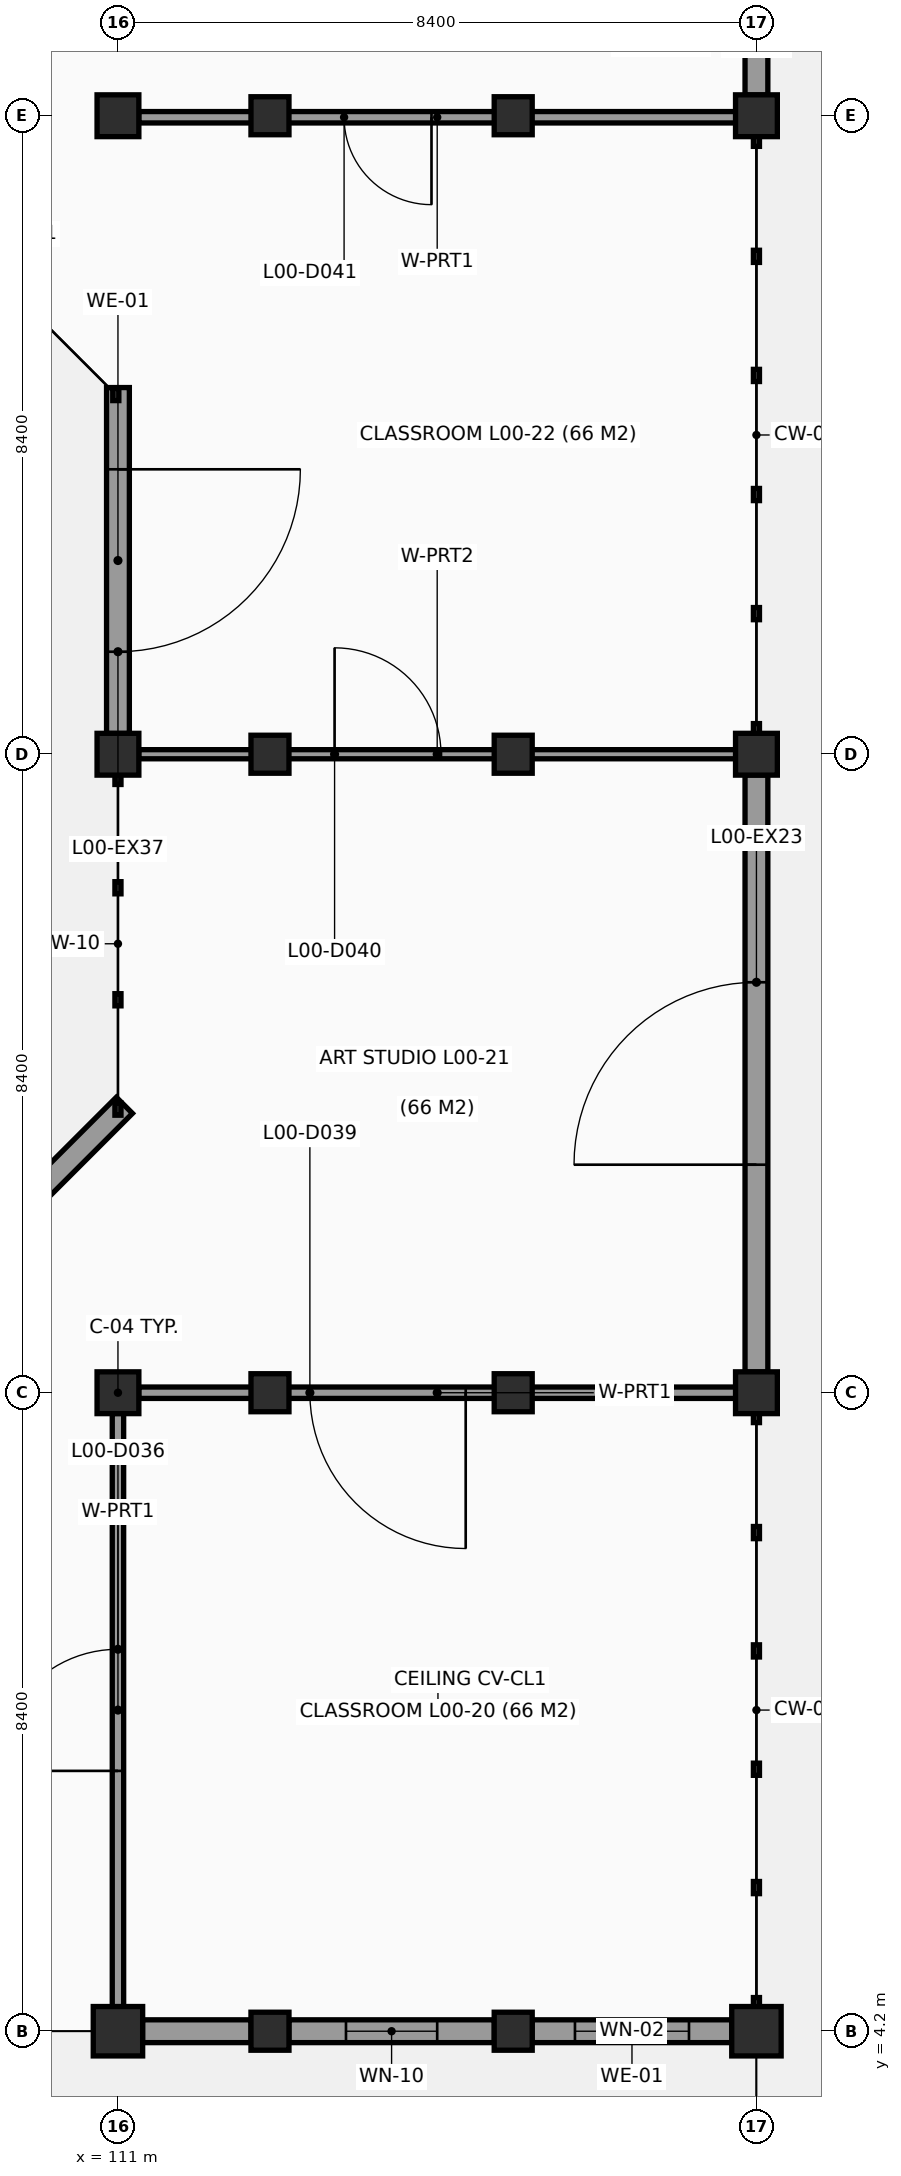
"""IFC4 building model, lengths in metres.
Left out: names, types, materials, properties, quantities, classifications, styles, units other than length and angle.
Written with IfcOpenShell. Run it as: python <this file> out.ifc"""

import sys

from ifc_helpers import new_model, si_unit, direction, frame, frame_2d, origin, origin_2d, place, context, subcontext, project, spatial, rectangle, extrude, element, fill, save


model = new_model("IFC4")
c1 = context("Model", 3, precision=1e-05, world=origin(), true_north=direction((0.0, 1.0)))
c2 = subcontext(c1, "Body", "Model", "MODEL_VIEW")
j1 = project(units=[si_unit("LENGTHUNIT", "METRE"), si_unit("PLANEANGLEUNIT", "RADIAN")], contexts=[c1])
p1 = place(None, origin())
s1 = spatial("IfcSite", under=j1, at=p1, CompositionType="ELEMENT")
p2 = place(p1, origin())
s2 = spatial("IfcBuilding", under=s1, at=p2, CompositionType="ELEMENT")
p3 = place(p2, origin())
s3 = spatial("IfcBuildingStorey", under=s2, at=p3, CompositionType="ELEMENT", Elevation=0.0)
p4 = place(p3, frame((111.0, 4.2, -0.4), z_axis=(0.0, 0.0, 1.0), x_axis=(1.0, 0.0, 0.0)))
e1 = element("IfcColumn", 1, at=p4, inside=s3, PredefinedType="COLUMN", context=c2, shape_type="SweptSolid", body=[
    extrude(rectangle(XDim=0.65, YDim=0.65, at=origin_2d()), origin(), (0.0, 0.0, 1.0), 4.6),
])
for number, where, z_axis, x_axis in (
    (2, (111.0, 12.6, -0.4), (0.0, 0.0, 1.0), (1.0, 0.0, 0.0)),
    (3, (111.0, 21.0, -0.4), (0.0, 0.0, 1.0), (1.0, 0.0, 0.0)),
    (4, (111.0, 29.4, -0.4), (0.0, 0.0, 1.0), (1.0, 0.0, 0.0)),
):
    element("IfcColumn", number, at=place(p3, frame(where, z_axis=z_axis, x_axis=x_axis)), inside=s3, PredefinedType="COLUMN", context=c2, shape_type="SweptSolid", body=[
        extrude(rectangle(XDim=0.55, YDim=0.55, at=origin_2d()), origin(), (0.0, 0.0, 1.0), 4.6),
    ])
p5 = place(p3, frame((119.4, 4.2, -0.4), z_axis=(0.0, 0.0, 1.0), x_axis=(1.0, 0.0, 0.0)))
e5 = element("IfcColumn", 5, at=p5, inside=s3, PredefinedType="COLUMN", context=c2, shape_type="SweptSolid", body=[
    extrude(rectangle(XDim=0.65, YDim=0.65, at=origin_2d()), origin(), (0.0, 0.0, 1.0), 4.6),
])
for number, where, z_axis, x_axis in (
    (6, (119.4, 12.6, -0.4), (0.0, 0.0, 1.0), (1.0, 0.0, 0.0)),
    (7, (119.4, 21.0, -0.4), (0.0, 0.0, 1.0), (1.0, 0.0, 0.0)),
    (8, (119.4, 29.4, -0.4), (0.0, 0.0, 1.0), (1.0, 0.0, 0.0)),
):
    element("IfcColumn", number, at=place(p3, frame(where, z_axis=z_axis, x_axis=x_axis)), inside=s3, PredefinedType="COLUMN", context=c2, shape_type="SweptSolid", body=[
        extrude(rectangle(XDim=0.55, YDim=0.55, at=origin_2d()), origin(), (0.0, 0.0, 1.0), 4.6),
    ])
for number, where, z_axis, x_axis in (
    (9, (116.2, 4.2, -0.4), (0.0, 0.0, 1.0), (1.0, 0.0, 0.0)),
    (10, (116.2, 12.6, -0.4), (0.0, 0.0, 1.0), (1.0, 0.0, 0.0)),
    (11, (116.2, 21.0, -0.4), (0.0, 0.0, 1.0), (1.0, 0.0, 0.0)),
    (12, (116.2, 29.4, -0.4), (0.0, 0.0, 1.0), (1.0, 0.0, 0.0)),
    (13, (113.0, 4.2, -0.4), (0.0, 0.0, 1.0), (1.0, 0.0, 0.0)),
    (14, (113.0, 12.6, -0.4), (0.0, 0.0, 1.0), (1.0, 0.0, 0.0)),
    (15, (113.0, 21.0, -0.4), (0.0, 0.0, 1.0), (1.0, 0.0, 0.0)),
    (16, (113.0, 29.4, -0.4), (0.0, 0.0, 1.0), (1.0, 0.0, 0.0)),
):
    element("IfcColumn", number, at=place(p3, frame(where, z_axis=z_axis, x_axis=x_axis)), inside=s3, PredefinedType="COLUMN", context=c2, shape_type="SweptSolid", body=[
        extrude(rectangle(XDim=0.5, YDim=0.5, at=origin_2d()), origin(), (0.0, 0.0, 1.0), 4.6),
    ])
p6 = place(p3, frame((119.4, 32.077, 0.0), z_axis=(0.0, 0.0, 1.0), x_axis=(0.0, -1.0, 0.0)))
e17 = element("IfcWall", 17, at=p6, inside=s3, PredefinedType="SOLIDWALL", context=c2, shape_type="SweptSolid", body=[
    extrude(rectangle(XDim=2.404, YDim=0.3, at=frame_2d((1.202, 0.0))), origin(), (0.0, 0.0, 1.0), 3.33),
])
p7 = place(p6, frame((0.602, 0.0, 0.95)))
e18 = element("IfcOpeningElement", 18, at=p7, cuts=e17, PredefinedType="OPENING", context=c2, shape_type="SweptSolid", body=[
    extrude(rectangle(XDim=1.2, YDim=1.2, at=frame_2d((0.6, 0.6))), frame((0.0, 0.16, 0.0), z_axis=(0.0, -1.0, 0.0), x_axis=(1.0, 0.0, 0.0)), (0.0, 0.0, 1.0), 0.32),
])
p8 = place(p3, frame((119.4, 20.727, 0.0), z_axis=(0.0, 0.0, 1.0), x_axis=(0.0, -1.0, 0.0)))
e19 = element("IfcWall", 19, at=p8, inside=s3, PredefinedType="SOLIDWALL", context=c2, shape_type="SweptSolid", body=[
    extrude(rectangle(XDim=7.854, YDim=0.3, at=frame_2d((3.927, 0.0))), origin(), (0.0, 0.0, 1.0), 3.28),
])
p9 = place(p8, frame((2.727, 0.0, 0.0)))
e20 = element("IfcOpeningElement", 20, at=p9, cuts=e19, PredefinedType="OPENING", context=c2, shape_type="SweptSolid", body=[
    extrude(rectangle(XDim=2.4, YDim=2.45, at=frame_2d((1.2, 1.225))), frame((0.0, 0.16, 0.0), z_axis=(0.0, -1.0, 0.0), x_axis=(1.0, 0.0, 0.0)), (0.0, 0.0, 1.0), 0.32),
])
p10 = place(p3, frame((119.077, 4.2, 0.0), z_axis=(0.0, 0.0, 1.0), x_axis=(-1.0, 0.0, 0.0)))
e21 = element("IfcWall", 21, at=p10, inside=s3, PredefinedType="SOLIDWALL", context=c2, shape_type="SweptSolid", body=[
    extrude(rectangle(XDim=2.629, YDim=0.3, at=frame_2d((1.314, 0.0))), origin(), (0.0, 0.0, 1.0), 3.18),
])
p11 = place(p10, frame((0.564, 0.0, 0.95)))
e22 = element("IfcOpeningElement", 22, at=p11, cuts=e21, PredefinedType="OPENING", context=c2, shape_type="SweptSolid", body=[
    extrude(rectangle(XDim=1.5, YDim=1.2, at=frame_2d((0.75, 0.6))), frame((0.0, 0.16, 0.0), z_axis=(0.0, -1.0, 0.0), x_axis=(1.0, 0.0, 0.0)), (0.0, 0.0, 1.0), 0.32),
])
p12 = place(p3, frame((115.952, 4.2, 0.0), z_axis=(0.0, 0.0, 1.0), x_axis=(-1.0, 0.0, 0.0)))
e23 = element("IfcWall", 23, at=p12, inside=s3, PredefinedType="SOLIDWALL", context=c2, shape_type="SweptSolid", body=[
    extrude(rectangle(XDim=2.704, YDim=0.3, at=frame_2d((1.352, 0.0))), origin(), (0.0, 0.0, 1.0), 3.18),
])
p13 = place(p12, frame((0.752, 0.0, 0.95)))
e24 = element("IfcOpeningElement", 24, at=p13, cuts=e23, PredefinedType="OPENING", context=c2, shape_type="SweptSolid", body=[
    extrude(rectangle(XDim=1.2, YDim=1.5, at=frame_2d((0.6, 0.75))), frame((0.0, 0.16, 0.0), z_axis=(0.0, -1.0, 0.0), x_axis=(1.0, 0.0, 0.0)), (0.0, 0.0, 1.0), 0.32),
])
p14 = place(p3, frame((112.752, 4.2, 0.0), z_axis=(0.0, 0.0, 1.0), x_axis=(-1.0, 0.0, 0.0)))
e25 = element("IfcWall", 25, at=p14, inside=s3, PredefinedType="SOLIDWALL", context=c2, shape_type="SweptSolid", body=[
    extrude(rectangle(XDim=1.429, YDim=0.3, at=frame_2d((0.714, 0.0))), origin(), (0.0, 0.0, 1.0), 3.18),
])
p15 = place(p3, frame((107.219, 12.515, 0.0), z_axis=(0.0, 0.0, 1.0), x_axis=(0.707129108877, 0.707084452791, 0.0)))
e26 = element("IfcWall", 26, at=p15, inside=s3, PredefinedType="SOLIDWALL", context=c2, shape_type="SweptSolid", body=[
    extrude(rectangle(XDim=5.467, YDim=0.3, at=frame_2d((2.733, 0.0))), origin(), (0.0, 0.0, 1.0), 3.22),
])
p16 = place(p3, frame((111.0, 21.273, 0.0), z_axis=(0.0, 0.0, 1.0), x_axis=(0.0, 1.0, 0.0)))
e27 = element("IfcWall", 27, at=p16, inside=s3, PredefinedType="SOLIDWALL", context=c2, shape_type="SweptSolid", body=[
    extrude(rectangle(XDim=4.551, YDim=0.3, at=frame_2d((2.275, 0.0))), origin(), (0.0, 0.0, 1.0), 3.22),
])
p17 = place(p16, frame((1.075, 0.0, 0.0)))
e28 = element("IfcOpeningElement", 28, at=p17, cuts=e27, PredefinedType="OPENING", context=c2, shape_type="SweptSolid", body=[
    extrude(rectangle(XDim=2.4, YDim=2.45, at=frame_2d((1.2, 1.225))), frame((0.0, 0.16, 0.0), z_axis=(0.0, -1.0, 0.0), x_axis=(1.0, 0.0, 0.0)), (0.0, 0.0, 1.0), 0.32),
])
p18 = place(p3, frame((111.0, 12.327, 0.0), z_axis=(0.0, 0.0, 1.0), x_axis=(0.0, -1.0, 0.0)))
e29 = element("IfcWall", 29, at=p18, inside=s3, PredefinedType="PARTITIONING", context=c2, shape_type="SweptSolid", body=[
    extrude(rectangle(XDim=7.804, YDim=0.15, at=frame_2d((3.902, 0.0))), origin(), (0.0, 0.0, 1.0), 3.27),
])
p19 = place(p18, frame((3.102, 0.0, 0.0)))
e30 = element("IfcOpeningElement", 30, at=p19, cuts=e29, PredefinedType="OPENING", context=c2, shape_type="SweptSolid", body=[
    extrude(rectangle(XDim=1.6, YDim=2.2, at=frame_2d((0.8, 1.1))), frame((0.0, 0.085, 0.0), z_axis=(0.0, -1.0, 0.0), x_axis=(1.0, 0.0, 0.0)), (0.0, 0.0, 1.0), 0.17),
])
p20 = place(p3, frame((111.273, 12.6, 0.0), z_axis=(0.0, 0.0, 1.0), x_axis=(1.0, 0.0, 0.0)))
e31 = element("IfcWall", 31, at=p20, inside=s3, PredefinedType="PARTITIONING", context=c2, shape_type="SweptSolid", body=[
    extrude(rectangle(XDim=7.854, YDim=0.15, at=frame_2d((3.927, 0.0))), origin(), (0.0, 0.0, 1.0), 3.43),
])
p21 = place(p20, frame((2.252, 0.0, 0.0)))
e32 = element("IfcOpeningElement", 32, at=p21, cuts=e31, PredefinedType="OPENING", context=c2, shape_type="SweptSolid", body=[
    extrude(rectangle(XDim=2.05, YDim=2.35, at=frame_2d((1.025, 1.175))), frame((0.0, 0.085, 0.0), z_axis=(0.0, -1.0, 0.0), x_axis=(1.0, 0.0, 0.0)), (0.0, 0.0, 1.0), 0.17),
])
p22 = place(p3, frame((111.273, 21.0, 0.0), z_axis=(0.0, 0.0, 1.0), x_axis=(1.0, 0.0, 0.0)))
e33 = element("IfcWall", 33, at=p22, inside=s3, PredefinedType="PARTITIONING", context=c2, shape_type="SweptSolid", body=[
    extrude(rectangle(XDim=7.854, YDim=0.12, at=frame_2d((3.927, 0.0))), origin(), (0.0, 0.0, 1.0), 3.49),
])
p23 = place(p22, frame((2.577, 0.0, 0.0)))
e34 = element("IfcOpeningElement", 34, at=p23, cuts=e33, PredefinedType="OPENING", context=c2, shape_type="SweptSolid", body=[
    extrude(rectangle(XDim=1.4, YDim=2.2, at=frame_2d((0.7, 1.1))), frame((0.0, 0.07, 0.0), z_axis=(0.0, -1.0, 0.0), x_axis=(1.0, 0.0, 0.0)), (0.0, 0.0, 1.0), 0.14),
])
p24 = place(p3, frame((111.273, 29.38, 0.0), z_axis=(0.0, 0.0, 1.0), x_axis=(1.0, 0.0, 0.0)))
e35 = element("IfcWall", 35, at=p24, inside=s3, PredefinedType="PARTITIONING", context=c2, shape_type="SweptSolid", body=[
    extrude(rectangle(XDim=7.854, YDim=0.15, at=frame_2d((3.927, 0.0))), origin(), (0.0, 0.0, 1.0), 3.13),
])
p25 = place(p24, frame((2.702, 0.0, 0.0)))
e36 = element("IfcOpeningElement", 36, at=p25, cuts=e35, PredefinedType="OPENING", context=c2, shape_type="SweptSolid", body=[
    extrude(rectangle(XDim=1.15, YDim=2.15, at=frame_2d((0.575, 1.075))), frame((0.0, 0.085, 0.0), z_axis=(0.0, -1.0, 0.0), x_axis=(1.0, 0.0, 0.0)), (0.0, 0.0, 1.0), 0.17),
])
p26 = place(p9, origin())
e37 = element("IfcDoor", 37, at=p26, inside=s3, OperationType="DOUBLE_DOOR_SINGLE_SWING", PredefinedType="DOOR", context=c2, shape_type="SweptSolid", body=[
    extrude(rectangle(XDim=2.4, YDim=2.45, at=frame_2d((1.2, 1.225))), frame((0.0, 0.025, 0.0), z_axis=(0.0, -1.0, 0.0), x_axis=(1.0, 0.0, 0.0)), (0.0, 0.0, 1.0), 0.05),
])
fill(e20, e37)
p27 = place(p11, origin())
e38 = element("IfcWindow", 38, at=p27, inside=s3, PartitioningType="SINGLE_PANEL", PredefinedType="WINDOW", context=c2, shape_type="SweptSolid", body=[
    extrude(rectangle(XDim=1.5, YDim=1.2, at=frame_2d((0.75, 0.6))), frame((0.0, 0.03, 0.0), z_axis=(0.0, -1.0, 0.0), x_axis=(1.0, 0.0, 0.0)), (0.0, 0.0, 1.0), 0.06),
])
fill(e22, e38)
p28 = place(p13, origin())
e39 = element("IfcWindow", 39, at=p28, inside=s3, PartitioningType="SINGLE_PANEL", PredefinedType="WINDOW", context=c2, shape_type="SweptSolid", body=[
    extrude(rectangle(XDim=1.2, YDim=1.5, at=frame_2d((0.6, 0.75))), frame((0.0, 0.03, 0.0), z_axis=(0.0, -1.0, 0.0), x_axis=(1.0, 0.0, 0.0)), (0.0, 0.0, 1.0), 0.06),
])
fill(e24, e39)
p29 = place(p17, origin())
e40 = element("IfcDoor", 40, at=p29, inside=s3, OperationType="DOUBLE_DOOR_SINGLE_SWING", PredefinedType="DOOR", context=c2, shape_type="SweptSolid", body=[
    extrude(rectangle(XDim=2.4, YDim=2.45, at=frame_2d((1.2, 1.225))), frame((0.0, 0.025, 0.0), z_axis=(0.0, -1.0, 0.0), x_axis=(1.0, 0.0, 0.0)), (0.0, 0.0, 1.0), 0.05),
])
fill(e28, e40)
p30 = place(p19, origin())
e41 = element("IfcDoor", 41, at=p30, inside=s3, OperationType="DOUBLE_DOOR_SINGLE_SWING", PredefinedType="DOOR", context=c2, shape_type="SweptSolid", body=[
    extrude(rectangle(XDim=1.6, YDim=2.2, at=frame_2d((0.8, 1.1))), frame((0.0, 0.025, 0.0), z_axis=(0.0, -1.0, 0.0), x_axis=(1.0, 0.0, 0.0)), (0.0, 0.0, 1.0), 0.05),
])
fill(e30, e41)
p31 = place(p21, origin())
e42 = element("IfcDoor", 42, at=p31, inside=s3, OperationType="DOUBLE_DOOR_SINGLE_SWING", PredefinedType="DOOR", context=c2, shape_type="SweptSolid", body=[
    extrude(rectangle(XDim=2.05, YDim=2.35, at=frame_2d((1.025, 1.175))), frame((0.0, 0.025, 0.0), z_axis=(0.0, -1.0, 0.0), x_axis=(1.0, 0.0, 0.0)), (0.0, 0.0, 1.0), 0.05),
])
fill(e32, e42)
p32 = place(p23, origin())
e43 = element("IfcDoor", 43, at=p32, inside=s3, OperationType="SINGLE_SWING_LEFT", PredefinedType="DOOR", context=c2, shape_type="SweptSolid", body=[
    extrude(rectangle(XDim=1.4, YDim=2.2, at=frame_2d((0.7, 1.1))), frame((0.0, 0.025, 0.0), z_axis=(0.0, -1.0, 0.0), x_axis=(1.0, 0.0, 0.0)), (0.0, 0.0, 1.0), 0.05),
])
fill(e34, e43)
p33 = place(p25, origin())
e44 = element("IfcDoor", 44, at=p33, inside=s3, OperationType="SINGLE_SWING_RIGHT", PredefinedType="DOOR", context=c2, shape_type="SweptSolid", body=[
    extrude(rectangle(XDim=1.15, YDim=2.15, at=frame_2d((0.575, 1.075))), frame((0.0, 0.025, 0.0), z_axis=(0.0, -1.0, 0.0), x_axis=(1.0, 0.0, 0.0)), (0.0, 0.0, 1.0), 0.05),
])
fill(e36, e44)
save(model, sys.argv[1])
